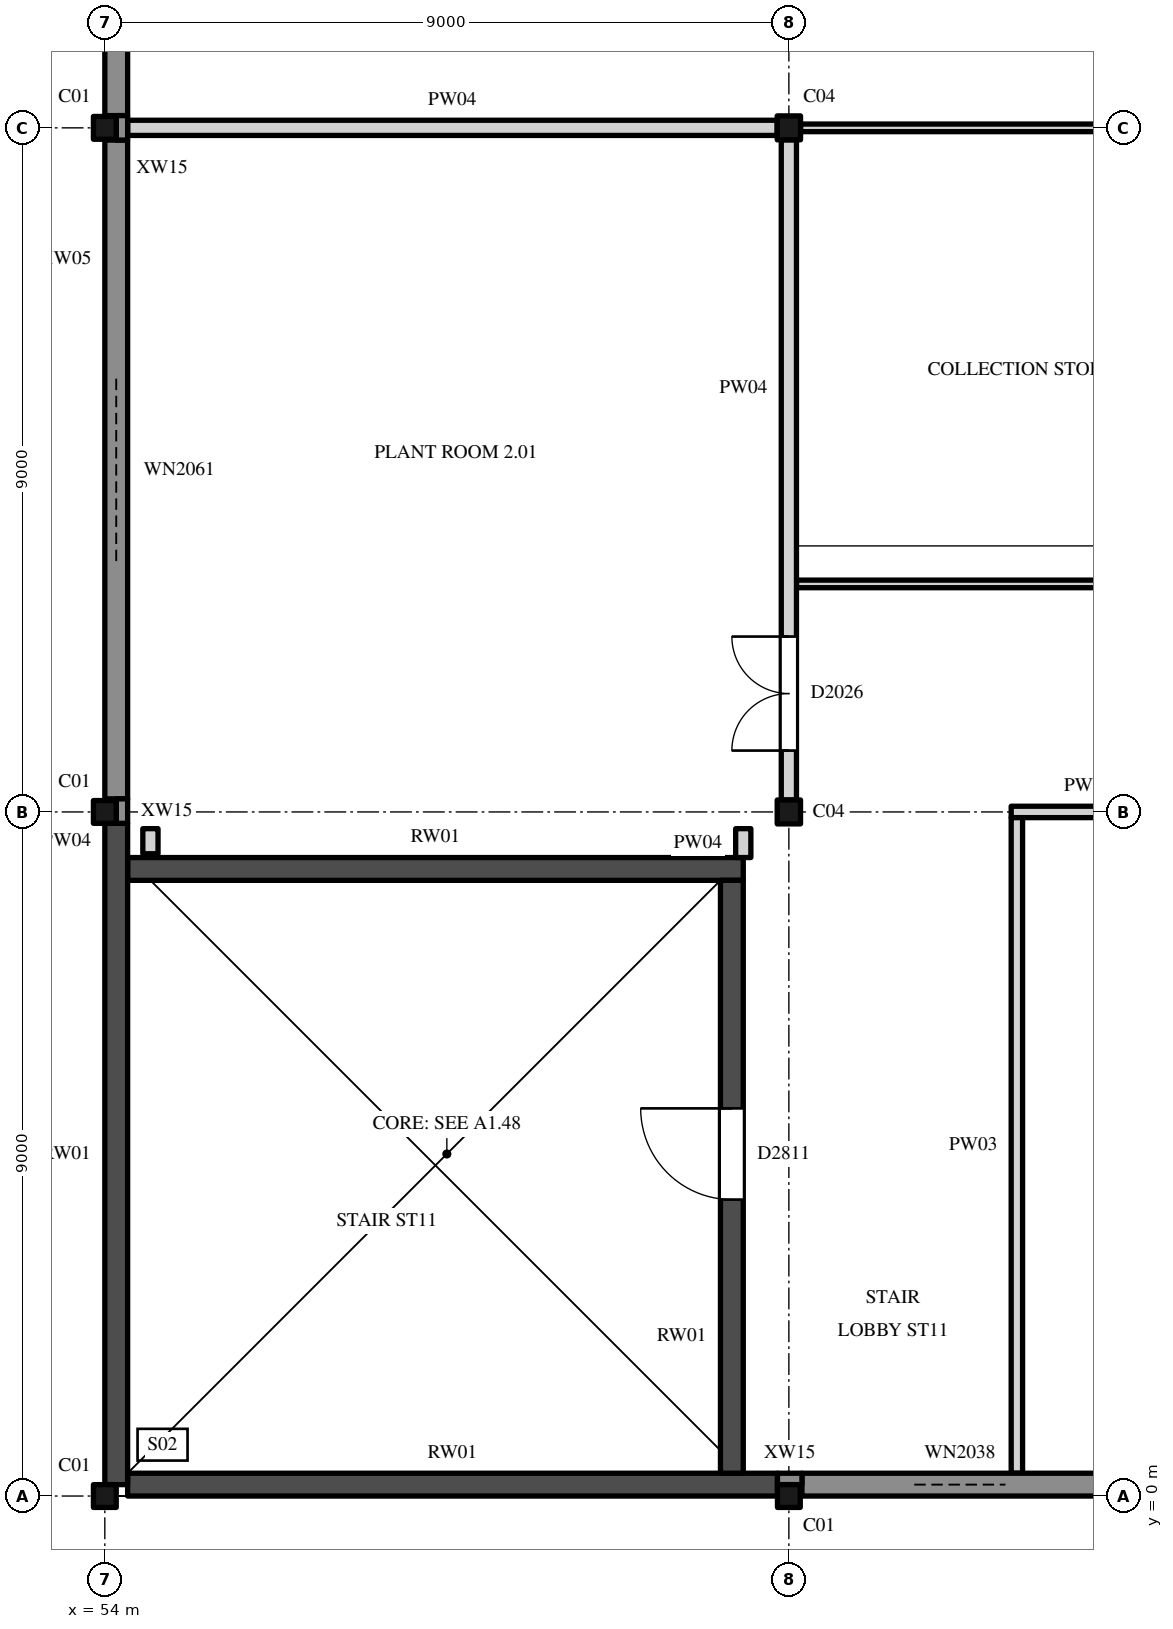
"""IFC4 building model, lengths in metres.
Left out: names, types, materials, properties, quantities, classifications, styles, units other than length and angle.
Written with IfcOpenShell. Run it as: python <this file> out.ifc"""

import sys

from ifc_helpers import new_model, si_unit, direction, frame, frame_2d, origin, origin_2d, place, context, subcontext, project, spatial, rectangle, hollow_rectangle, i_section, extrude, element, fill, save


model = new_model("IFC4")
c1 = context("Model", 3, precision=1e-05, world=origin(), true_north=direction((0.0, 1.0)))
c2 = subcontext(c1, "Body", "Model", "MODEL_VIEW")
j1 = project(units=[si_unit("LENGTHUNIT", "METRE"), si_unit("PLANEANGLEUNIT", "RADIAN")], contexts=[c1])
p1 = place(None, origin())
s1 = spatial("IfcSite", under=j1, at=p1, CompositionType="ELEMENT")
p2 = place(p1, origin())
s2 = spatial("IfcBuilding", under=s1, at=p2, CompositionType="ELEMENT")
p3 = place(p2, frame((0.0, 0.0, 11.0)))
s3 = spatial("IfcBuildingStorey", under=s2, at=p3, CompositionType="ELEMENT", Elevation=11.0)
for number, where, z_axis, x_axis in (
    (1, (54.0, 0.0, 0.0), (0.0, 0.0, 1.0), (1.0, 0.0, 0.0)),
    (2, (63.0, 0.0, 0.0), (0.0, 0.0, 1.0), (1.0, 0.0, 0.0)),
    (3, (54.0, 9.0, 0.0), (0.0, 0.0, 1.0), (1.0, 0.0, 0.0)),
):
    element("IfcColumn", number, at=place(p3, frame(where, z_axis=z_axis, x_axis=x_axis)), inside=s3, PredefinedType="COLUMN", context=c2, shape_type="SweptSolid", body=[
        extrude(hollow_rectangle(XDim=0.3, YDim=0.3, WallThickness=0.012, InnerFilletRadius=0.019, OuterFilletRadius=0.031, at=origin_2d()), origin(), (0.0, 0.0, 1.0), 5.0),
    ])
p4 = place(p3, frame((63.0, 9.0, 0.0), z_axis=(0.0, 0.0, 1.0), x_axis=(1.0, 0.0, 0.0)))
e4 = element("IfcColumn", 4, at=p4, inside=s3, PredefinedType="COLUMN", context=c2, shape_type="SweptSolid", body=[
    extrude(i_section(OverallWidth=0.307, OverallDepth=0.315, WebThickness=0.012, FlangeThickness=0.019, FilletRadius=0.017, at=origin_2d()), origin(), (0.0, 0.0, 1.0), 5.0),
])
p5 = place(p3, frame((54.0, 18.0, 0.0), z_axis=(0.0, 0.0, 1.0), x_axis=(1.0, 0.0, 0.0)))
e5 = element("IfcColumn", 5, at=p5, inside=s3, PredefinedType="COLUMN", context=c2, shape_type="SweptSolid", body=[
    extrude(hollow_rectangle(XDim=0.3, YDim=0.3, WallThickness=0.012, InnerFilletRadius=0.019, OuterFilletRadius=0.031, at=origin_2d()), origin(), (0.0, 0.0, 1.0), 5.0),
])
p6 = place(p3, frame((63.0, 18.0, 0.0), z_axis=(0.0, 0.0, 1.0), x_axis=(1.0, 0.0, 0.0)))
e6 = element("IfcColumn", 6, at=p6, inside=s3, PredefinedType="COLUMN", context=c2, shape_type="SweptSolid", body=[
    extrude(i_section(OverallWidth=0.307, OverallDepth=0.315, WebThickness=0.012, FlangeThickness=0.019, FilletRadius=0.017, at=origin_2d()), origin(), (0.0, 0.0, 1.0), 5.0),
])
p7 = place(p3, frame((54.3, 0.15, 0.0), z_axis=(0.0, 0.0, 1.0), x_axis=(1.0, 0.0, 0.0)))
e7 = element("IfcWall", 7, at=p7, inside=s3, PredefinedType="SHEAR", context=c2, shape_type="SweptSolid", body=[
    extrude(rectangle(XDim=8.55, YDim=0.3, at=frame_2d((4.275, 0.0))), origin(), (0.0, 0.0, 1.0), 4.825),
])
p8 = place(p3, frame((54.3, 8.25, 0.0), z_axis=(0.0, 0.0, 1.0), x_axis=(1.0, 0.0, 0.0)))
e8 = element("IfcWall", 8, at=p8, inside=s3, PredefinedType="SHEAR", context=c2, shape_type="SweptSolid", body=[
    extrude(rectangle(XDim=8.1, YDim=0.3, at=frame_2d((4.05, 0.0))), origin(), (0.0, 0.0, 1.0), 4.825),
])
p9 = place(p3, frame((54.15, 0.15, 0.0), z_axis=(0.0, 0.0, 1.0), x_axis=(0.0, 1.0, 0.0)))
e9 = element("IfcWall", 9, at=p9, inside=s3, PredefinedType="SHEAR", context=c2, shape_type="SweptSolid", body=[
    extrude(rectangle(XDim=8.7, YDim=0.3, at=frame_2d((4.35, 0.0))), origin(), (0.0, 0.0, 1.0), 4.825),
])
p10 = place(p3, frame((62.25, 0.3, 0.0), z_axis=(0.0, 0.0, 1.0), x_axis=(0.0, 1.0, 0.0)))
e10 = element("IfcWall", 10, at=p10, inside=s3, PredefinedType="SHEAR", context=c2, shape_type="SweptSolid", body=[
    extrude(rectangle(XDim=7.8, YDim=0.3, at=frame_2d((3.9, 0.0))), origin(), (0.0, 0.0, 1.0), 4.825),
])
p11 = place(p10, frame((3.6, 0.0, 0.0)))
e11 = element("IfcOpeningElement", 11, at=p11, cuts=e10, PredefinedType="OPENING", context=c2, shape_type="SweptSolid", body=[
    extrude(rectangle(XDim=1.2, YDim=2.1, at=frame_2d((0.6, 1.05))), frame((0.0, 0.16, 0.0), z_axis=(0.0, -1.0, 0.0), x_axis=(1.0, 0.0, 0.0)), (0.0, 0.0, 1.0), 0.32),
])
p12 = place(p3, frame((63.172, 0.15, 0.0), z_axis=(0.0, 0.0, 1.0), x_axis=(1.0, 0.0, 0.0)))
e12 = element("IfcWall", 12, at=p12, inside=s3, PredefinedType="SOLIDWALL", context=c2, shape_type="SweptSolid", body=[
    extrude(rectangle(XDim=8.667, YDim=0.3, at=frame_2d((4.333, 0.0))), origin(), (0.0, 0.0, 1.0), 4.825),
])
p13 = place(p12, frame((1.478, 0.0, 1.2)))
e13 = element("IfcOpeningElement", 13, at=p13, cuts=e12, PredefinedType="OPENING", context=c2, shape_type="SweptSolid", body=[
    extrude(rectangle(XDim=1.2, YDim=1.5, at=frame_2d((0.6, 0.75))), frame((0.0, 0.16, 0.0), z_axis=(0.0, -1.0, 0.0), x_axis=(1.0, 0.0, 0.0)), (0.0, 0.0, 1.0), 0.32),
])
p14 = place(p12, frame((5.978, 0.0, 1.2)))
e14 = element("IfcOpeningElement", 14, at=p14, cuts=e12, PredefinedType="OPENING", context=c2, shape_type="SweptSolid", body=[
    extrude(rectangle(XDim=1.2, YDim=1.5, at=frame_2d((0.6, 0.75))), frame((0.0, 0.16, 0.0), z_axis=(0.0, -1.0, 0.0), x_axis=(1.0, 0.0, 0.0)), (0.0, 0.0, 1.0), 0.32),
])
p15 = place(p3, frame((54.15, 9.172, 0.0), z_axis=(0.0, 0.0, 1.0), x_axis=(0.0, 1.0, 0.0)))
e15 = element("IfcWall", 15, at=p15, inside=s3, PredefinedType="SOLIDWALL", context=c2, shape_type="SweptSolid", body=[
    extrude(rectangle(XDim=8.667, YDim=0.3, at=frame_2d((4.333, 0.0))), origin(), (0.0, 0.0, 1.0), 4.825),
])
p16 = place(p15, frame((3.128, 0.0, 0.9)))
e16 = element("IfcOpeningElement", 16, at=p16, cuts=e15, PredefinedType="OPENING", context=c2, shape_type="SweptSolid", body=[
    extrude(rectangle(XDim=2.4, YDim=1.8, at=frame_2d((1.2, 0.9))), frame((0.0, 0.16, 0.0), z_axis=(0.0, -1.0, 0.0), x_axis=(1.0, 0.0, 0.0)), (0.0, 0.0, 1.0), 0.32),
])
p17 = place(p3, frame((54.15, 18.161, 0.0), z_axis=(0.0, 0.0, 1.0), x_axis=(0.0, 1.0, 0.0)))
e17 = element("IfcWall", 17, at=p17, inside=s3, PredefinedType="SOLIDWALL", context=c2, shape_type="SweptSolid", body=[
    extrude(rectangle(XDim=8.667, YDim=0.3, at=frame_2d((4.333, 0.0))), origin(), (0.0, 0.0, 1.0), 4.825),
])
p18 = place(p17, frame((1.489, 0.0, 1.2)))
e18 = element("IfcOpeningElement", 18, at=p18, cuts=e17, PredefinedType="OPENING", context=c2, shape_type="SweptSolid", body=[
    extrude(rectangle(XDim=1.2, YDim=1.5, at=frame_2d((0.6, 0.75))), frame((0.0, 0.16, 0.0), z_axis=(0.0, -1.0, 0.0), x_axis=(1.0, 0.0, 0.0)), (0.0, 0.0, 1.0), 0.32),
])
p19 = place(p17, frame((5.989, 0.0, 1.2)))
e19 = element("IfcOpeningElement", 19, at=p19, cuts=e17, PredefinedType="OPENING", context=c2, shape_type="SweptSolid", body=[
    extrude(rectangle(XDim=1.2, YDim=1.5, at=frame_2d((0.6, 0.75))), frame((0.0, 0.16, 0.0), z_axis=(0.0, -1.0, 0.0), x_axis=(1.0, 0.0, 0.0)), (0.0, 0.0, 1.0), 0.32),
])
for number, where, z_axis, x_axis in (
    (20, (62.85, 0.225, 0.0), (0.0, 0.0, 1.0), (1.0, 0.0, 0.0)),
    (21, (54.225, 8.85, 0.0), (0.0, 0.0, 1.0), (0.0, 1.0, 0.0)),
):
    element("IfcWall", number, at=place(p3, frame(where, z_axis=z_axis, x_axis=x_axis)), inside=s3, PredefinedType="SOLIDWALL", context=c2, shape_type="SweptSolid", body=[
        extrude(rectangle(XDim=0.322, YDim=0.15, at=frame_2d((0.161, 0.0))), origin(), (0.0, 0.0, 1.0), 4.825),
    ])
p20 = place(p3, frame((54.225, 17.839, 0.0), z_axis=(0.0, 0.0, 1.0), x_axis=(0.0, 1.0, 0.0)))
e22 = element("IfcWall", 22, at=p20, inside=s3, PredefinedType="SOLIDWALL", context=c2, shape_type="SweptSolid", body=[
    extrude(rectangle(XDim=0.322, YDim=0.15, at=frame_2d((0.161, 0.0))), origin(), (0.0, 0.0, 1.0), 4.825),
])
for number, where, z_axis, x_axis in (
    (23, (55.5, 2.325, 5.0), (0.0, 0.0, 1.0), (1.0, 0.0, 0.0)),
    (24, (55.5, 6.675, 5.0), (0.0, 0.0, 1.0), (1.0, 0.0, 0.0)),
):
    element("IfcWall", number, at=place(p3, frame(where, z_axis=z_axis, x_axis=x_axis)), inside=s3, PredefinedType="PARAPET", context=c2, shape_type="SweptSolid", body=[
        extrude(rectangle(XDim=6.0, YDim=0.15, at=frame_2d((3.0, 0.0))), origin(), (0.0, 0.0, 1.0), 0.5),
    ])
for number, where, z_axis, x_axis in (
    (25, (55.575, 2.4, 5.0), (0.0, 0.0, 1.0), (0.0, 1.0, 0.0)),
    (26, (61.425, 2.4, 5.0), (0.0, 0.0, 1.0), (0.0, 1.0, 0.0)),
):
    element("IfcWall", number, at=place(p3, frame(where, z_axis=z_axis, x_axis=x_axis)), inside=s3, PredefinedType="PARAPET", context=c2, shape_type="SweptSolid", body=[
        extrude(rectangle(XDim=4.2, YDim=0.15, at=frame_2d((2.1, 0.0))), origin(), (0.0, 0.0, 1.0), 0.5),
    ])
for number, where, z_axis, x_axis in (
    (27, (64.5, 2.325, 5.0), (0.0, 0.0, 1.0), (1.0, 0.0, 0.0)),
    (28, (64.5, 6.675, 5.0), (0.0, 0.0, 1.0), (1.0, 0.0, 0.0)),
):
    element("IfcWall", number, at=place(p3, frame(where, z_axis=z_axis, x_axis=x_axis)), inside=s3, PredefinedType="PARAPET", context=c2, shape_type="SweptSolid", body=[
        extrude(rectangle(XDim=6.0, YDim=0.15, at=frame_2d((3.0, 0.0))), origin(), (0.0, 0.0, 1.0), 0.5),
    ])
p21 = place(p3, frame((64.575, 2.4, 5.0), z_axis=(0.0, 0.0, 1.0), x_axis=(0.0, 1.0, 0.0)))
e29 = element("IfcWall", 29, at=p21, inside=s3, PredefinedType="PARAPET", context=c2, shape_type="SweptSolid", body=[
    extrude(rectangle(XDim=4.2, YDim=0.15, at=frame_2d((2.1, 0.0))), origin(), (0.0, 0.0, 1.0), 0.5),
])
for number, where, z_axis, x_axis in (
    (30, (64.5, 11.325, 5.0), (0.0, 0.0, 1.0), (1.0, 0.0, 0.0)),
    (31, (64.5, 15.675, 5.0), (0.0, 0.0, 1.0), (1.0, 0.0, 0.0)),
):
    element("IfcWall", number, at=place(p3, frame(where, z_axis=z_axis, x_axis=x_axis)), inside=s3, PredefinedType="PARAPET", context=c2, shape_type="SweptSolid", body=[
        extrude(rectangle(XDim=6.0, YDim=0.15, at=frame_2d((3.0, 0.0))), origin(), (0.0, 0.0, 1.0), 0.5),
    ])
p22 = place(p3, frame((64.575, 11.4, 5.0), z_axis=(0.0, 0.0, 1.0), x_axis=(0.0, 1.0, 0.0)))
e32 = element("IfcWall", 32, at=p22, inside=s3, PredefinedType="PARAPET", context=c2, shape_type="SweptSolid", body=[
    extrude(rectangle(XDim=4.2, YDim=0.15, at=frame_2d((2.1, 0.0))), origin(), (0.0, 0.0, 1.0), 0.5),
])
p23 = place(p3, frame((65.925, 9.0, 0.0), z_axis=(0.0, 0.0, 1.0), x_axis=(1.0, 0.0, 0.0)))
e33 = element("IfcWall", 33, at=p23, inside=s3, PredefinedType="PARTITIONING", context=c2, shape_type="SweptSolid", body=[
    extrude(rectangle(XDim=5.921, YDim=0.15, at=frame_2d((2.961, 0.0))), origin(), (0.0, 0.0, 1.0), 4.419),
])
p24 = place(p23, frame((2.025, 0.0, 0.0)))
e34 = element("IfcOpeningElement", 34, at=p24, cuts=e33, PredefinedType="OPENING", context=c2, shape_type="SweptSolid", body=[
    extrude(rectangle(XDim=2.0, YDim=2.4, at=frame_2d((1.0, 1.2))), frame((0.0, 0.085, 0.0), z_axis=(0.0, -1.0, 0.0), x_axis=(1.0, 0.0, 0.0)), (0.0, 0.0, 1.0), 0.17),
])
p25 = place(p3, frame((63.1, 12.0, 0.0), z_axis=(0.0, 0.0, 1.0), x_axis=(1.0, 0.0, 0.0)))
e35 = element("IfcWall", 35, at=p25, inside=s3, PredefinedType="PARTITIONING", context=c2, shape_type="SweptSolid", body=[
    extrude(rectangle(XDim=35.95, YDim=0.1, at=frame_2d((17.975, 0.0))), origin(), (0.0, 0.0, 1.0), 4.422),
])
p26 = place(p25, frame((12.75, 0.0, 0.0)))
e36 = element("IfcOpeningElement", 36, at=p26, cuts=e35, PredefinedType="OPENING", context=c2, shape_type="SweptSolid", body=[
    extrude(rectangle(XDim=1.35, YDim=2.4, at=frame_2d((0.675, 1.2))), frame((0.0, 0.06, 0.0), z_axis=(0.0, -1.0, 0.0), x_axis=(1.0, 0.0, 0.0)), (0.0, 0.0, 1.0), 0.12),
])
p27 = place(p25, frame((30.75, 0.0, 0.0)))
e37 = element("IfcOpeningElement", 37, at=p27, cuts=e35, PredefinedType="OPENING", context=c2, shape_type="SweptSolid", body=[
    extrude(rectangle(XDim=1.35, YDim=2.4, at=frame_2d((0.675, 1.2))), frame((0.0, 0.06, 0.0), z_axis=(0.0, -1.0, 0.0), x_axis=(1.0, 0.0, 0.0)), (0.0, 0.0, 1.0), 0.12),
])
p28 = place(p3, frame((54.3, 18.0, 0.0), z_axis=(0.0, 0.0, 1.0), x_axis=(1.0, 0.0, 0.0)))
e38 = element("IfcWall", 38, at=p28, inside=s3, PredefinedType="PARTITIONING", context=c2, shape_type="SweptSolid", body=[
    extrude(rectangle(XDim=8.546, YDim=0.2, at=frame_2d((4.273, 0.0))), origin(), (0.0, 0.0, 1.0), 4.419),
])
p29 = place(p3, frame((63.154, 18.0, 0.0), z_axis=(0.0, 0.0, 1.0), x_axis=(1.0, 0.0, 0.0)))
e39 = element("IfcWall", 39, at=p29, inside=s3, PredefinedType="PARTITIONING", context=c2, shape_type="SweptSolid", body=[
    extrude(rectangle(XDim=8.693, YDim=0.1, at=frame_2d((4.346, 0.0))), origin(), (0.0, 0.0, 1.0), 4.419),
])
p30 = place(p3, frame((54.6, 8.45, 0.0), z_axis=(0.0, 0.0, 1.0), x_axis=(0.0, 1.0, 0.0)))
e40 = element("IfcWall", 40, at=p30, inside=s3, PredefinedType="PARTITIONING", context=c2, shape_type="SweptSolid", body=[
    extrude(rectangle(XDim=0.33, YDim=0.2, at=frame_2d((0.165, 0.0))), origin(), (0.0, 0.0, 1.0), 4.825),
])
p31 = place(p3, frame((62.4, 8.4, 0.0), z_axis=(0.0, 0.0, 1.0), x_axis=(0.0, 1.0, 0.0)))
e41 = element("IfcWall", 41, at=p31, inside=s3, PredefinedType="PARTITIONING", context=c2, shape_type="SweptSolid", body=[
    extrude(rectangle(XDim=0.38, YDim=0.2, at=frame_2d((0.19, 0.0))), origin(), (0.0, 0.0, 1.0), 4.825),
])
p32 = place(p3, frame((63.0, 9.157, 0.0), z_axis=(0.0, 0.0, 1.0), x_axis=(0.0, 1.0, 0.0)))
e42 = element("IfcWall", 42, at=p32, inside=s3, PredefinedType="PARTITIONING", context=c2, shape_type="SweptSolid", body=[
    extrude(rectangle(XDim=8.686, YDim=0.2, at=frame_2d((4.343, 0.0))), origin(), (0.0, 0.0, 1.0), 4.297),
])
p33 = place(p32, frame((0.65, 0.0, 0.0)))
e43 = element("IfcOpeningElement", 43, at=p33, cuts=e42, PredefinedType="OPENING", context=c2, shape_type="SweptSolid", body=[
    extrude(rectangle(XDim=1.5, YDim=2.4, at=frame_2d((0.75, 1.2))), frame((0.0, 0.11, 0.0), z_axis=(0.0, -1.0, 0.0), x_axis=(1.0, 0.0, 0.0)), (0.0, 0.0, 1.0), 0.22),
])
p34 = place(p3, frame((66.0, 0.3, 0.0), z_axis=(0.0, 0.0, 1.0), x_axis=(0.0, 1.0, 0.0)))
e44 = element("IfcWall", 44, at=p34, inside=s3, PredefinedType="PARTITIONING", context=c2, shape_type="SweptSolid", body=[
    extrude(rectangle(XDim=8.625, YDim=0.15, at=frame_2d((4.312, 0.0))), origin(), (0.0, 0.0, 1.0), 4.825),
])
p35 = place(p11, origin())
e45 = element("IfcDoor", 45, at=p35, inside=s3, OperationType="SINGLE_SWING_LEFT", PredefinedType="DOOR", context=c2, shape_type="SweptSolid", body=[
    extrude(rectangle(XDim=1.2, YDim=2.1, at=frame_2d((0.6, 1.05))), frame((0.0, 0.025, 0.0), z_axis=(0.0, -1.0, 0.0), x_axis=(1.0, 0.0, 0.0)), (0.0, 0.0, 1.0), 0.05),
])
fill(e11, e45)
p36 = place(p13, origin())
e46 = element("IfcWindow", 46, at=p36, inside=s3, PartitioningType="SINGLE_PANEL", PredefinedType="WINDOW", context=c2, shape_type="SweptSolid", body=[
    extrude(rectangle(XDim=1.2, YDim=1.5, at=frame_2d((0.6, 0.75))), frame((0.0, 0.03, 0.0), z_axis=(0.0, -1.0, 0.0), x_axis=(1.0, 0.0, 0.0)), (0.0, 0.0, 1.0), 0.06),
])
fill(e13, e46)
p37 = place(p16, origin())
e47 = element("IfcWindow", 47, at=p37, inside=s3, PartitioningType="TRIPLE_PANEL_VERTICAL", PredefinedType="WINDOW", context=c2, shape_type="SweptSolid", body=[
    extrude(rectangle(XDim=2.4, YDim=1.8, at=frame_2d((1.2, 0.9))), frame((0.0, 0.03, 0.0), z_axis=(0.0, -1.0, 0.0), x_axis=(1.0, 0.0, 0.0)), (0.0, 0.0, 1.0), 0.06),
])
fill(e16, e47)
p38 = place(p33, origin())
e48 = element("IfcDoor", 48, at=p38, inside=s3, OperationType="DOUBLE_DOOR_SINGLE_SWING", PredefinedType="DOOR", context=c2, shape_type="SweptSolid", body=[
    extrude(rectangle(XDim=1.5, YDim=2.4, at=frame_2d((0.75, 1.2))), frame((0.0, 0.025, 0.0), z_axis=(0.0, -1.0, 0.0), x_axis=(1.0, 0.0, 0.0)), (0.0, 0.0, 1.0), 0.05),
])
fill(e43, e48)
save(model, sys.argv[1])
